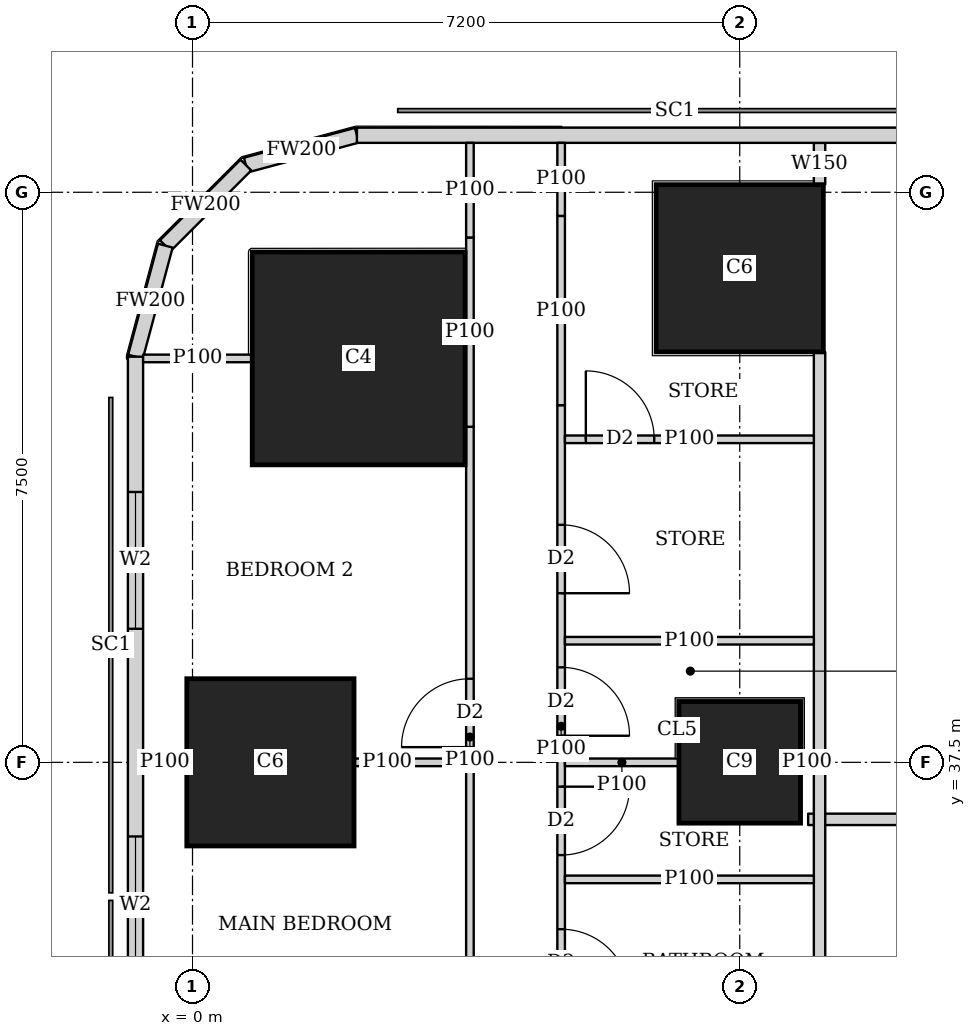
"""IFC4 building model, lengths in metres.
Left out: names, types, materials, properties, quantities, classifications, styles, units other than length and angle.
Written with IfcOpenShell. Run it as: python <this file> out.ifc"""

import sys

from ifc_helpers import new_model, si_unit, direction, frame, frame_2d, origin, origin_2d, place, context, subcontext, project, spatial, rectangle, extrude, element, fill, save


model = new_model("IFC4")
c1 = context("Model", 3, precision=1e-05, world=origin(), true_north=direction((0.0, 1.0)))
c2 = subcontext(c1, "Body", "Model", "MODEL_VIEW")
j1 = project(units=[si_unit("LENGTHUNIT", "METRE"), si_unit("PLANEANGLEUNIT", "RADIAN")], contexts=[c1])
p1 = place(None, origin())
s1 = spatial("IfcSite", under=j1, at=p1, CompositionType="ELEMENT")
p2 = place(p1, origin())
s2 = spatial("IfcBuilding", under=s1, at=p2, CompositionType="ELEMENT")
p3 = place(p2, frame((0.0, 0.0, 122.9)))
s3 = spatial("IfcBuildingStorey", under=s2, at=p3, CompositionType="ELEMENT", Elevation=122.9)
p4 = place(p3, frame((1.025, 37.5, 0.0), z_axis=(0.0, 0.0, 1.0), x_axis=(1.0, 0.0, 0.0)))
e1 = element("IfcColumn", 1, at=p4, inside=s3, PredefinedType="COLUMN", context=c2, shape_type="SweptSolid", body=[
    extrude(rectangle(XDim=2.2, YDim=2.2, at=origin_2d()), origin(), (0.0, 0.0, 1.0), 3.75),
])
p5 = place(p3, frame((7.2, 37.5, 0.0), z_axis=(0.0, 0.0, 1.0), x_axis=(1.0, 0.0, 0.0)))
e2 = element("IfcColumn", 2, at=p5, inside=s3, PredefinedType="COLUMN", context=c2, shape_type="SweptSolid", body=[
    extrude(rectangle(XDim=1.6, YDim=1.6, at=origin_2d()), origin(), (0.0, 0.0, 1.0), 3.75),
])
p6 = place(p3, frame((2.186, 42.814, 0.0), z_axis=(0.0, 0.0, 1.0), x_axis=(1.0, 0.0, 0.0)))
e3 = element("IfcColumn", 3, at=p6, inside=s3, PredefinedType="COLUMN", context=c2, shape_type="SweptSolid", body=[
    extrude(rectangle(XDim=2.8, YDim=2.8, at=origin_2d()), origin(), (0.0, 0.0, 1.0), 3.75),
])
p7 = place(p3, frame((7.2, 44.0, 0.0), z_axis=(0.0, 0.0, 1.0), x_axis=(1.0, 0.0, 0.0)))
e4 = element("IfcColumn", 4, at=p7, inside=s3, PredefinedType="COLUMN", context=c2, shape_type="SweptSolid", body=[
    extrude(rectangle(XDim=2.2, YDim=2.2, at=origin_2d()), origin(), (0.0, 0.0, 1.0), 3.75),
])
p8 = place(p3, frame((40.106, 45.75, 0.0), z_axis=(0.0, 0.0, 1.0), x_axis=(-1.0, 0.0, 0.0)))
e5 = element("IfcWall", 5, at=p8, inside=s3, PredefinedType="SOLIDWALL", context=c2, shape_type="SweptSolid", body=[
    extrude(rectangle(XDim=37.943, YDim=0.2, at=frame_2d((18.971, 0.0))), origin(), (0.0, 0.0, 1.0), 3.5),
])
p9 = place(p8, frame((8.606, 0.0, 0.9)))
e6 = element("IfcOpeningElement", 6, at=p9, cuts=e5, PredefinedType="OPENING", context=c2, shape_type="SweptSolid", body=[
    extrude(rectangle(XDim=1.8, YDim=1.5, at=frame_2d((0.9, 0.75))), frame((0.0, 0.11, 0.0), z_axis=(0.0, -1.0, 0.0), x_axis=(1.0, 0.0, 0.0)), (0.0, 0.0, 1.0), 0.22),
])
p10 = place(p8, frame((12.206, 0.0, 0.9)))
e7 = element("IfcOpeningElement", 7, at=p10, cuts=e5, PredefinedType="OPENING", context=c2, shape_type="SweptSolid", body=[
    extrude(rectangle(XDim=1.8, YDim=1.5, at=frame_2d((0.9, 0.75))), frame((0.0, 0.11, 0.0), z_axis=(0.0, -1.0, 0.0), x_axis=(1.0, 0.0, 0.0)), (0.0, 0.0, 1.0), 0.22),
])
p11 = place(p8, frame((15.806, 0.0, 0.9)))
e8 = element("IfcOpeningElement", 8, at=p11, cuts=e5, PredefinedType="OPENING", context=c2, shape_type="SweptSolid", body=[
    extrude(rectangle(XDim=1.8, YDim=1.5, at=frame_2d((0.9, 0.75))), frame((0.0, 0.11, 0.0), z_axis=(0.0, -1.0, 0.0), x_axis=(1.0, 0.0, 0.0)), (0.0, 0.0, 1.0), 0.22),
])
p12 = place(p8, frame((19.406, 0.0, 0.9)))
e9 = element("IfcOpeningElement", 9, at=p12, cuts=e5, PredefinedType="OPENING", context=c2, shape_type="SweptSolid", body=[
    extrude(rectangle(XDim=1.8, YDim=1.5, at=frame_2d((0.9, 0.75))), frame((0.0, 0.11, 0.0), z_axis=(0.0, -1.0, 0.0), x_axis=(1.0, 0.0, 0.0)), (0.0, 0.0, 1.0), 0.22),
])
p13 = place(p8, frame((23.006, 0.0, 0.9)))
e10 = element("IfcOpeningElement", 10, at=p13, cuts=e5, PredefinedType="OPENING", context=c2, shape_type="SweptSolid", body=[
    extrude(rectangle(XDim=1.8, YDim=1.5, at=frame_2d((0.9, 0.75))), frame((0.0, 0.11, 0.0), z_axis=(0.0, -1.0, 0.0), x_axis=(1.0, 0.0, 0.0)), (0.0, 0.0, 1.0), 0.22),
])
p14 = place(p8, frame((26.606, 0.0, 0.9)))
e11 = element("IfcOpeningElement", 11, at=p14, cuts=e5, PredefinedType="OPENING", context=c2, shape_type="SweptSolid", body=[
    extrude(rectangle(XDim=1.8, YDim=1.5, at=frame_2d((0.9, 0.75))), frame((0.0, 0.11, 0.0), z_axis=(0.0, -1.0, 0.0), x_axis=(1.0, 0.0, 0.0)), (0.0, 0.0, 1.0), 0.22),
])
p15 = place(p3, frame((2.163, 45.75, 0.0), z_axis=(0.0, 0.0, 1.0), x_axis=(-0.965832000415, -0.259168954497, 0.0)))
e12 = element("IfcWall", 12, at=p15, inside=s3, PredefinedType="SOLIDWALL", context=c2, shape_type="SweptSolid", body=[
    extrude(rectangle(XDim=1.513, YDim=0.2, at=frame_2d((0.756, 0.0))), origin(), (0.0, 0.0, 1.0), 3.5),
])
p16 = place(p3, frame((0.702, 45.358, 0.0), z_axis=(0.0, 0.0, 1.0), x_axis=(-0.707106781187, -0.707106781187, 0.0)))
e13 = element("IfcWall", 13, at=p16, inside=s3, PredefinedType="SOLIDWALL", context=c2, shape_type="SweptSolid", body=[
    extrude(rectangle(XDim=1.499, YDim=0.2, at=frame_2d((0.75, 0.0))), origin(), (0.0, 0.0, 1.0), 3.5),
])
p17 = place(p3, frame((-0.358, 44.298, 0.0), z_axis=(0.0, 0.0, 1.0), x_axis=(-0.259168954497, -0.965832000415, 0.0)))
e14 = element("IfcWall", 14, at=p17, inside=s3, PredefinedType="SOLIDWALL", context=c2, shape_type="SweptSolid", body=[
    extrude(rectangle(XDim=1.513, YDim=0.2, at=frame_2d((0.756, 0.0))), origin(), (0.0, 0.0, 1.0), 3.5),
])
p18 = place(p3, frame((-0.75, 42.837, 0.0), z_axis=(0.0, 0.0, 1.0), x_axis=(0.0, -1.0, 0.0)))
e15 = element("IfcWall", 15, at=p18, inside=s3, PredefinedType="SOLIDWALL", context=c2, shape_type="SweptSolid", body=[
    extrude(rectangle(XDim=40.674, YDim=0.2, at=frame_2d((20.337, 0.0))), origin(), (0.0, 0.0, 1.0), 3.5),
])
p19 = place(p18, frame((1.78, 0.0, 0.9)))
e16 = element("IfcOpeningElement", 16, at=p19, cuts=e15, PredefinedType="OPENING", context=c2, shape_type="SweptSolid", body=[
    extrude(rectangle(XDim=1.8, YDim=1.5, at=frame_2d((0.9, 0.75))), frame((0.0, 0.11, 0.0), z_axis=(0.0, -1.0, 0.0), x_axis=(1.0, 0.0, 0.0)), (0.0, 0.0, 1.0), 0.22),
])
p20 = place(p18, frame((6.312, 0.0, 0.9)))
e17 = element("IfcOpeningElement", 17, at=p20, cuts=e15, PredefinedType="OPENING", context=c2, shape_type="SweptSolid", body=[
    extrude(rectangle(XDim=1.8, YDim=1.5, at=frame_2d((0.9, 0.75))), frame((0.0, 0.11, 0.0), z_axis=(0.0, -1.0, 0.0), x_axis=(1.0, 0.0, 0.0)), (0.0, 0.0, 1.0), 0.22),
])
p21 = place(p18, frame((10.062, 0.0, 0.9)))
e18 = element("IfcOpeningElement", 18, at=p21, cuts=e15, PredefinedType="OPENING", context=c2, shape_type="SweptSolid", body=[
    extrude(rectangle(XDim=1.8, YDim=1.5, at=frame_2d((0.9, 0.75))), frame((0.0, 0.11, 0.0), z_axis=(0.0, -1.0, 0.0), x_axis=(1.0, 0.0, 0.0)), (0.0, 0.0, 1.0), 0.22),
])
p22 = place(p18, frame((13.812, 0.0, 0.9)))
e19 = element("IfcOpeningElement", 19, at=p22, cuts=e15, PredefinedType="OPENING", context=c2, shape_type="SweptSolid", body=[
    extrude(rectangle(XDim=1.8, YDim=1.5, at=frame_2d((0.9, 0.75))), frame((0.0, 0.11, 0.0), z_axis=(0.0, -1.0, 0.0), x_axis=(1.0, 0.0, 0.0)), (0.0, 0.0, 1.0), 0.22),
])
p23 = place(p18, frame((17.562, 0.0, 0.9)))
e20 = element("IfcOpeningElement", 20, at=p23, cuts=e15, PredefinedType="OPENING", context=c2, shape_type="SweptSolid", body=[
    extrude(rectangle(XDim=1.8, YDim=1.5, at=frame_2d((0.9, 0.75))), frame((0.0, 0.11, 0.0), z_axis=(0.0, -1.0, 0.0), x_axis=(1.0, 0.0, 0.0)), (0.0, 0.0, 1.0), 0.22),
])
p24 = place(p18, frame((21.312, 0.0, 0.9)))
e21 = element("IfcOpeningElement", 21, at=p24, cuts=e15, PredefinedType="OPENING", context=c2, shape_type="SweptSolid", body=[
    extrude(rectangle(XDim=1.8, YDim=1.5, at=frame_2d((0.9, 0.75))), frame((0.0, 0.11, 0.0), z_axis=(0.0, -1.0, 0.0), x_axis=(1.0, 0.0, 0.0)), (0.0, 0.0, 1.0), 0.22),
])
p25 = place(p18, frame((25.062, 0.0, 0.9)))
e22 = element("IfcOpeningElement", 22, at=p25, cuts=e15, PredefinedType="OPENING", context=c2, shape_type="SweptSolid", body=[
    extrude(rectangle(XDim=1.8, YDim=1.5, at=frame_2d((0.9, 0.75))), frame((0.0, 0.11, 0.0), z_axis=(0.0, -1.0, 0.0), x_axis=(1.0, 0.0, 0.0)), (0.0, 0.0, 1.0), 0.22),
])
p26 = place(p18, frame((28.812, 0.0, 0.9)))
e23 = element("IfcOpeningElement", 23, at=p26, cuts=e15, PredefinedType="OPENING", context=c2, shape_type="SweptSolid", body=[
    extrude(rectangle(XDim=1.8, YDim=1.5, at=frame_2d((0.9, 0.75))), frame((0.0, 0.11, 0.0), z_axis=(0.0, -1.0, 0.0), x_axis=(1.0, 0.0, 0.0)), (0.0, 0.0, 1.0), 0.22),
])
p27 = place(p18, frame((32.562, 0.0, 0.9)))
e24 = element("IfcOpeningElement", 24, at=p27, cuts=e15, PredefinedType="OPENING", context=c2, shape_type="SweptSolid", body=[
    extrude(rectangle(XDim=1.8, YDim=1.5, at=frame_2d((0.9, 0.75))), frame((0.0, 0.11, 0.0), z_axis=(0.0, -1.0, 0.0), x_axis=(1.0, 0.0, 0.0)), (0.0, 0.0, 1.0), 0.22),
])
p28 = place(p18, frame((37.094, 0.0, 0.9)))
e25 = element("IfcOpeningElement", 25, at=p28, cuts=e15, PredefinedType="OPENING", context=c2, shape_type="SweptSolid", body=[
    extrude(rectangle(XDim=1.8, YDim=1.5, at=frame_2d((0.9, 0.75))), frame((0.0, 0.11, 0.0), z_axis=(0.0, -1.0, 0.0), x_axis=(1.0, 0.0, 0.0)), (0.0, 0.0, 1.0), 0.22),
])
p29 = place(p3, frame((8.25, 2.126, 0.0), z_axis=(0.0, 0.0, 1.0), x_axis=(0.0, 1.0, 0.0)))
e26 = element("IfcWall", 26, at=p29, inside=s3, PredefinedType="SOLIDWALL", context=c2, shape_type="SweptSolid", body=[
    extrude(rectangle(XDim=40.773, YDim=0.15, at=frame_2d((20.386, 0.0))), origin(), (0.0, 0.0, 1.0), 3.5),
])
p30 = place(p29, frame((10.286, 0.0, 0.0)))
e27 = element("IfcOpeningElement", 27, at=p30, cuts=e26, PredefinedType="OPENING", context=c2, shape_type="SweptSolid", body=[
    extrude(rectangle(XDim=1.0, YDim=2.1, at=frame_2d((0.5, 1.05))), frame((0.0, 0.085, 0.0), z_axis=(0.0, -1.0, 0.0), x_axis=(1.0, 0.0, 0.0)), (0.0, 0.0, 1.0), 0.17),
])
p31 = place(p29, frame((14.461, 0.0, 0.0)))
e28 = element("IfcOpeningElement", 28, at=p31, cuts=e26, PredefinedType="OPENING", context=c2, shape_type="SweptSolid", body=[
    extrude(rectangle(XDim=1.0, YDim=2.1, at=frame_2d((0.5, 1.05))), frame((0.0, 0.085, 0.0), z_axis=(0.0, -1.0, 0.0), x_axis=(1.0, 0.0, 0.0)), (0.0, 0.0, 1.0), 0.17),
])
p32 = place(p29, frame((21.962, 0.0, 0.0)))
e29 = element("IfcOpeningElement", 29, at=p32, cuts=e26, PredefinedType="OPENING", context=c2, shape_type="SweptSolid", body=[
    extrude(rectangle(XDim=1.0, YDim=2.1, at=frame_2d((0.5, 1.05))), frame((0.0, 0.085, 0.0), z_axis=(0.0, -1.0, 0.0), x_axis=(1.0, 0.0, 0.0)), (0.0, 0.0, 1.0), 0.17),
])
p33 = place(p29, frame((29.461, 0.0, 0.0)))
e30 = element("IfcOpeningElement", 30, at=p33, cuts=e26, PredefinedType="OPENING", context=c2, shape_type="SweptSolid", body=[
    extrude(rectangle(XDim=1.0, YDim=2.1, at=frame_2d((0.5, 1.05))), frame((0.0, 0.085, 0.0), z_axis=(0.0, -1.0, 0.0), x_axis=(1.0, 0.0, 0.0)), (0.0, 0.0, 1.0), 0.17),
])
p34 = place(p3, frame((8.25, 45.101, 0.0), z_axis=(0.0, 0.0, 1.0), x_axis=(0.0, 1.0, 0.0)))
e31 = element("IfcWall", 31, at=p34, inside=s3, PredefinedType="SOLIDWALL", context=c2, shape_type="SweptSolid", body=[
    extrude(rectangle(XDim=0.549, YDim=0.15, at=frame_2d((0.274, 0.0))), origin(), (0.0, 0.0, 1.0), 3.5),
])
p35 = place(p3, frame((8.1, 36.75, 0.0), z_axis=(0.0, 0.0, 1.0), x_axis=(1.0, 0.0, 0.0)))
e32 = element("IfcWall", 32, at=p35, inside=s3, PredefinedType="SOLIDWALL", context=c2, shape_type="SweptSolid", body=[
    extrude(rectangle(XDim=5.499, YDim=0.15, at=frame_2d((2.75, 0.0))), origin(), (0.0, 0.0, 1.0), 3.5),
])
p36 = place(p35, frame((2.725, 0.0, 0.0)))
e33 = element("IfcOpeningElement", 33, at=p36, cuts=e32, PredefinedType="OPENING", context=c2, shape_type="SweptSolid", body=[
    extrude(rectangle(XDim=1.0, YDim=2.1, at=frame_2d((0.5, 1.05))), frame((0.0, 0.085, 0.0), z_axis=(0.0, -1.0, 0.0), x_axis=(1.0, 0.0, 0.0)), (0.0, 0.0, 1.0), 0.17),
])
p37 = place(p3, frame((3.65, 33.75, 0.0), z_axis=(0.0, 0.0, 1.0), x_axis=(0.0, 1.0, 0.0)))
e34 = element("IfcWall", 34, at=p37, inside=s3, PredefinedType="PARTITIONING", context=c2, shape_type="SweptSolid", body=[
    extrude(rectangle(XDim=8.165, YDim=0.1, at=frame_2d((4.083, 0.0))), origin(), (0.0, 0.0, 1.0), 3.5),
])
p38 = place(p37, frame((0.2, 0.0, 0.0)))
e35 = element("IfcOpeningElement", 35, at=p38, cuts=e34, PredefinedType="OPENING", context=c2, shape_type="SweptSolid", body=[
    extrude(rectangle(XDim=0.9, YDim=2.1, at=frame_2d((0.45, 1.05))), frame((0.0, 0.06, 0.0), z_axis=(0.0, -1.0, 0.0), x_axis=(1.0, 0.0, 0.0)), (0.0, 0.0, 1.0), 0.12),
])
p39 = place(p37, frame((3.95, 0.0, 0.0)))
e36 = element("IfcOpeningElement", 36, at=p39, cuts=e34, PredefinedType="OPENING", context=c2, shape_type="SweptSolid", body=[
    extrude(rectangle(XDim=0.9, YDim=2.1, at=frame_2d((0.45, 1.05))), frame((0.0, 0.06, 0.0), z_axis=(0.0, -1.0, 0.0), x_axis=(1.0, 0.0, 0.0)), (0.0, 0.0, 1.0), 0.12),
])
p40 = place(p3, frame((3.65, 41.915, 0.0), z_axis=(0.0, 0.0, 1.0), x_axis=(0.0, 1.0, 0.0)))
e37 = element("IfcWall", 37, at=p40, inside=s3, PredefinedType="PARTITIONING", context=c2, shape_type="SweptSolid", body=[
    extrude(rectangle(XDim=2.49, YDim=0.1, at=frame_2d((1.245, 0.0))), origin(), (0.0, 0.0, 1.0), 2.05),
])
p41 = place(p3, frame((3.65, 44.405, 0.0), z_axis=(0.0, 0.0, 1.0), x_axis=(0.0, 1.0, 0.0)))
e38 = element("IfcWall", 38, at=p41, inside=s3, PredefinedType="PARTITIONING", context=c2, shape_type="SweptSolid", body=[
    extrude(rectangle(XDim=1.245, YDim=0.1, at=frame_2d((0.623, 0.0))), origin(), (0.0, 0.0, 1.0), 3.5),
])
p42 = place(p3, frame((4.85, 33.75, 0.0), z_axis=(0.0, 0.0, 1.0), x_axis=(0.0, 1.0, 0.0)))
e39 = element("IfcWall", 39, at=p42, inside=s3, PredefinedType="PARTITIONING", context=c2, shape_type="SweptSolid", body=[
    extrude(rectangle(XDim=8.449, YDim=0.1, at=frame_2d((4.225, 0.0))), origin(), (0.0, 0.0, 1.0), 3.5),
])
p43 = place(p42, frame((0.655, 0.0, 0.0)))
e40 = element("IfcOpeningElement", 40, at=p43, cuts=e39, PredefinedType="OPENING", context=c2, shape_type="SweptSolid", body=[
    extrude(rectangle(XDim=0.9, YDim=2.1, at=frame_2d((0.45, 1.05))), frame((0.0, 0.06, 0.0), z_axis=(0.0, -1.0, 0.0), x_axis=(1.0, 0.0, 0.0)), (0.0, 0.0, 1.0), 0.12),
])
p44 = place(p42, frame((4.1, 0.0, 0.0)))
e41 = element("IfcOpeningElement", 41, at=p44, cuts=e39, PredefinedType="OPENING", context=c2, shape_type="SweptSolid", body=[
    extrude(rectangle(XDim=0.9, YDim=2.1, at=frame_2d((0.45, 1.05))), frame((0.0, 0.06, 0.0), z_axis=(0.0, -1.0, 0.0), x_axis=(1.0, 0.0, 0.0)), (0.0, 0.0, 1.0), 0.12),
])
p45 = place(p42, frame((2.53, 0.0, 0.0)))
e42 = element("IfcOpeningElement", 42, at=p45, cuts=e39, PredefinedType="OPENING", context=c2, shape_type="SweptSolid", body=[
    extrude(rectangle(XDim=0.9, YDim=2.1, at=frame_2d((0.45, 1.05))), frame((0.0, 0.06, 0.0), z_axis=(0.0, -1.0, 0.0), x_axis=(1.0, 0.0, 0.0)), (0.0, 0.0, 1.0), 0.12),
])
p46 = place(p42, frame((5.975, 0.0, 0.0)))
e43 = element("IfcOpeningElement", 43, at=p46, cuts=e39, PredefinedType="OPENING", context=c2, shape_type="SweptSolid", body=[
    extrude(rectangle(XDim=0.9, YDim=2.1, at=frame_2d((0.45, 1.05))), frame((0.0, 0.06, 0.0), z_axis=(0.0, -1.0, 0.0), x_axis=(1.0, 0.0, 0.0)), (0.0, 0.0, 1.0), 0.12),
])
p47 = place(p3, frame((4.85, 42.199, 0.0), z_axis=(0.0, 0.0, 1.0), x_axis=(0.0, 1.0, 0.0)))
e44 = element("IfcWall", 44, at=p47, inside=s3, PredefinedType="PARTITIONING", context=c2, shape_type="SweptSolid", body=[
    extrude(rectangle(XDim=2.49, YDim=0.1, at=frame_2d((1.245, 0.0))), origin(), (0.0, 0.0, 1.0), 2.05),
])
p48 = place(p3, frame((4.85, 44.689, 0.0), z_axis=(0.0, 0.0, 1.0), x_axis=(0.0, 1.0, 0.0)))
e45 = element("IfcWall", 45, at=p48, inside=s3, PredefinedType="PARTITIONING", context=c2, shape_type="SweptSolid", body=[
    extrude(rectangle(XDim=0.961, YDim=0.1, at=frame_2d((0.48, 0.0))), origin(), (0.0, 0.0, 1.0), 3.5),
])
p49 = place(p3, frame((-0.65, 37.5, 0.0), z_axis=(0.0, 0.0, 1.0), x_axis=(1.0, 0.0, 0.0)))
e46 = element("IfcWall", 46, at=p49, inside=s3, PredefinedType="PARTITIONING", context=c2, shape_type="SweptSolid", body=[
    extrude(rectangle(XDim=0.574, YDim=0.1, at=frame_2d((0.287, 0.0))), origin(), (0.0, 0.0, 1.0), 2.05),
])
p50 = place(p3, frame((2.126, 37.5, 0.0), z_axis=(0.0, 0.0, 1.0), x_axis=(1.0, 0.0, 0.0)))
e47 = element("IfcWall", 47, at=p50, inside=s3, PredefinedType="PARTITIONING", context=c2, shape_type="SweptSolid", body=[
    extrude(rectangle(XDim=1.474, YDim=0.1, at=frame_2d((0.737, 0.0))), origin(), (0.0, 0.0, 1.0), 2.05),
])
p51 = place(p3, frame((-0.65, 42.814, 0.0), z_axis=(0.0, 0.0, 1.0), x_axis=(1.0, 0.0, 0.0)))
e48 = element("IfcWall", 48, at=p51, inside=s3, PredefinedType="PARTITIONING", context=c2, shape_type="SweptSolid", body=[
    extrude(rectangle(XDim=1.435, YDim=0.1, at=frame_2d((0.717, 0.0))), origin(), (0.0, 0.0, 1.0), 3.5),
])
p52 = place(p3, frame((4.9, 37.5, 0.0), z_axis=(0.0, 0.0, 1.0), x_axis=(1.0, 0.0, 0.0)))
e49 = element("IfcWall", 49, at=p52, inside=s3, PredefinedType="PARTITIONING", context=c2, shape_type="SweptSolid", body=[
    extrude(rectangle(XDim=1.499, YDim=0.1, at=frame_2d((0.75, 0.0))), origin(), (0.0, 0.0, 1.0), 3.5),
])
p53 = place(p3, frame((8.001, 37.5, 0.0), z_axis=(0.0, 0.0, 1.0), x_axis=(1.0, 0.0, 0.0)))
e50 = element("IfcWall", 50, at=p53, inside=s3, PredefinedType="PARTITIONING", context=c2, shape_type="SweptSolid", body=[
    extrude(rectangle(XDim=0.174, YDim=0.1, at=frame_2d((0.087, 0.0))), origin(), (0.0, 0.0, 1.0), 3.5),
])
for number, where, z_axis, x_axis in (
    (51, (4.9, 35.96, 0.0), (0.0, 0.0, 1.0), (1.0, 0.0, 0.0)),
    (52, (4.9, 39.1, 0.0), (0.0, 0.0, 1.0), (1.0, 0.0, 0.0)),
):
    element("IfcWall", number, at=place(p3, frame(where, z_axis=z_axis, x_axis=x_axis)), inside=s3, PredefinedType="PARTITIONING", context=c2, shape_type="SweptSolid", body=[
        extrude(rectangle(XDim=3.275, YDim=0.1, at=frame_2d((1.638, 0.0))), origin(), (0.0, 0.0, 1.0), 3.5),
    ])
p54 = place(p3, frame((8.175, 41.75, 0.0), z_axis=(0.0, 0.0, 1.0), x_axis=(-1.0, 0.0, 0.0)))
e53 = element("IfcWall", 53, at=p54, inside=s3, PredefinedType="PARTITIONING", context=c2, shape_type="SweptSolid", body=[
    extrude(rectangle(XDim=3.275, YDim=0.1, at=frame_2d((1.638, 0.0))), origin(), (0.0, 0.0, 1.0), 3.5),
])
p55 = place(p54, frame((2.1, 0.0, 0.0)))
e54 = element("IfcOpeningElement", 54, at=p55, cuts=e53, PredefinedType="OPENING", context=c2, shape_type="SweptSolid", body=[
    extrude(rectangle(XDim=0.9, YDim=2.1, at=frame_2d((0.45, 1.05))), frame((0.0, 0.06, 0.0), z_axis=(0.0, -1.0, 0.0), x_axis=(1.0, 0.0, 0.0)), (0.0, 0.0, 1.0), 0.12),
])
p56 = place(p19, origin())
e55 = element("IfcWindow", 55, at=p56, inside=s3, PartitioningType="SINGLE_PANEL", PredefinedType="WINDOW", context=c2, shape_type="SweptSolid", body=[
    extrude(rectangle(XDim=1.8, YDim=1.5, at=frame_2d((0.9, 0.75))), frame((0.0, 0.03, 0.0), z_axis=(0.0, -1.0, 0.0), x_axis=(1.0, 0.0, 0.0)), (0.0, 0.0, 1.0), 0.06),
])
fill(e16, e55)
p57 = place(p20, origin())
e56 = element("IfcWindow", 56, at=p57, inside=s3, PartitioningType="SINGLE_PANEL", PredefinedType="WINDOW", context=c2, shape_type="SweptSolid", body=[
    extrude(rectangle(XDim=1.8, YDim=1.5, at=frame_2d((0.9, 0.75))), frame((0.0, 0.03, 0.0), z_axis=(0.0, -1.0, 0.0), x_axis=(1.0, 0.0, 0.0)), (0.0, 0.0, 1.0), 0.06),
])
fill(e17, e56)
p58 = place(p39, origin())
e57 = element("IfcDoor", 57, at=p58, inside=s3, OperationType="SINGLE_SWING_LEFT", PredefinedType="DOOR", context=c2, shape_type="SweptSolid", body=[
    extrude(rectangle(XDim=0.9, YDim=2.1, at=frame_2d((0.45, 1.05))), frame((0.0, 0.025, 0.0), z_axis=(0.0, -1.0, 0.0), x_axis=(1.0, 0.0, 0.0)), (0.0, 0.0, 1.0), 0.05),
])
fill(e36, e57)
p59 = place(p43, origin())
e58 = element("IfcDoor", 58, at=p59, inside=s3, OperationType="SINGLE_SWING_RIGHT", PredefinedType="DOOR", context=c2, shape_type="SweptSolid", body=[
    extrude(rectangle(XDim=0.9, YDim=2.1, at=frame_2d((0.45, 1.05))), frame((0.0, 0.025, 0.0), z_axis=(0.0, -1.0, 0.0), x_axis=(1.0, 0.0, 0.0)), (0.0, 0.0, 1.0), 0.05),
])
fill(e40, e58)
p60 = place(p44, origin())
e59 = element("IfcDoor", 59, at=p60, inside=s3, OperationType="SINGLE_SWING_RIGHT", PredefinedType="DOOR", context=c2, shape_type="SweptSolid", body=[
    extrude(rectangle(XDim=0.9, YDim=2.1, at=frame_2d((0.45, 1.05))), frame((0.0, 0.025, 0.0), z_axis=(0.0, -1.0, 0.0), x_axis=(1.0, 0.0, 0.0)), (0.0, 0.0, 1.0), 0.05),
])
fill(e41, e59)
p61 = place(p45, origin())
e60 = element("IfcDoor", 60, at=p61, inside=s3, OperationType="SINGLE_SWING_LEFT", PredefinedType="DOOR", context=c2, shape_type="SweptSolid", body=[
    extrude(rectangle(XDim=0.9, YDim=2.1, at=frame_2d((0.45, 1.05))), frame((0.0, 0.025, 0.0), z_axis=(0.0, -1.0, 0.0), x_axis=(1.0, 0.0, 0.0)), (0.0, 0.0, 1.0), 0.05),
])
fill(e42, e60)
p62 = place(p46, origin())
e61 = element("IfcDoor", 61, at=p62, inside=s3, OperationType="SINGLE_SWING_RIGHT", PredefinedType="DOOR", context=c2, shape_type="SweptSolid", body=[
    extrude(rectangle(XDim=0.9, YDim=2.1, at=frame_2d((0.45, 1.05))), frame((0.0, 0.025, 0.0), z_axis=(0.0, -1.0, 0.0), x_axis=(1.0, 0.0, 0.0)), (0.0, 0.0, 1.0), 0.05),
])
fill(e43, e61)
p63 = place(p55, origin())
e62 = element("IfcDoor", 62, at=p63, inside=s3, OperationType="SINGLE_SWING_LEFT", PredefinedType="DOOR", context=c2, shape_type="SweptSolid", body=[
    extrude(rectangle(XDim=0.9, YDim=2.1, at=frame_2d((0.45, 1.05))), frame((0.0, 0.025, 0.0), z_axis=(0.0, -1.0, 0.0), x_axis=(1.0, 0.0, 0.0)), (0.0, 0.0, 1.0), 0.05),
])
fill(e54, e62)
save(model, sys.argv[1])
